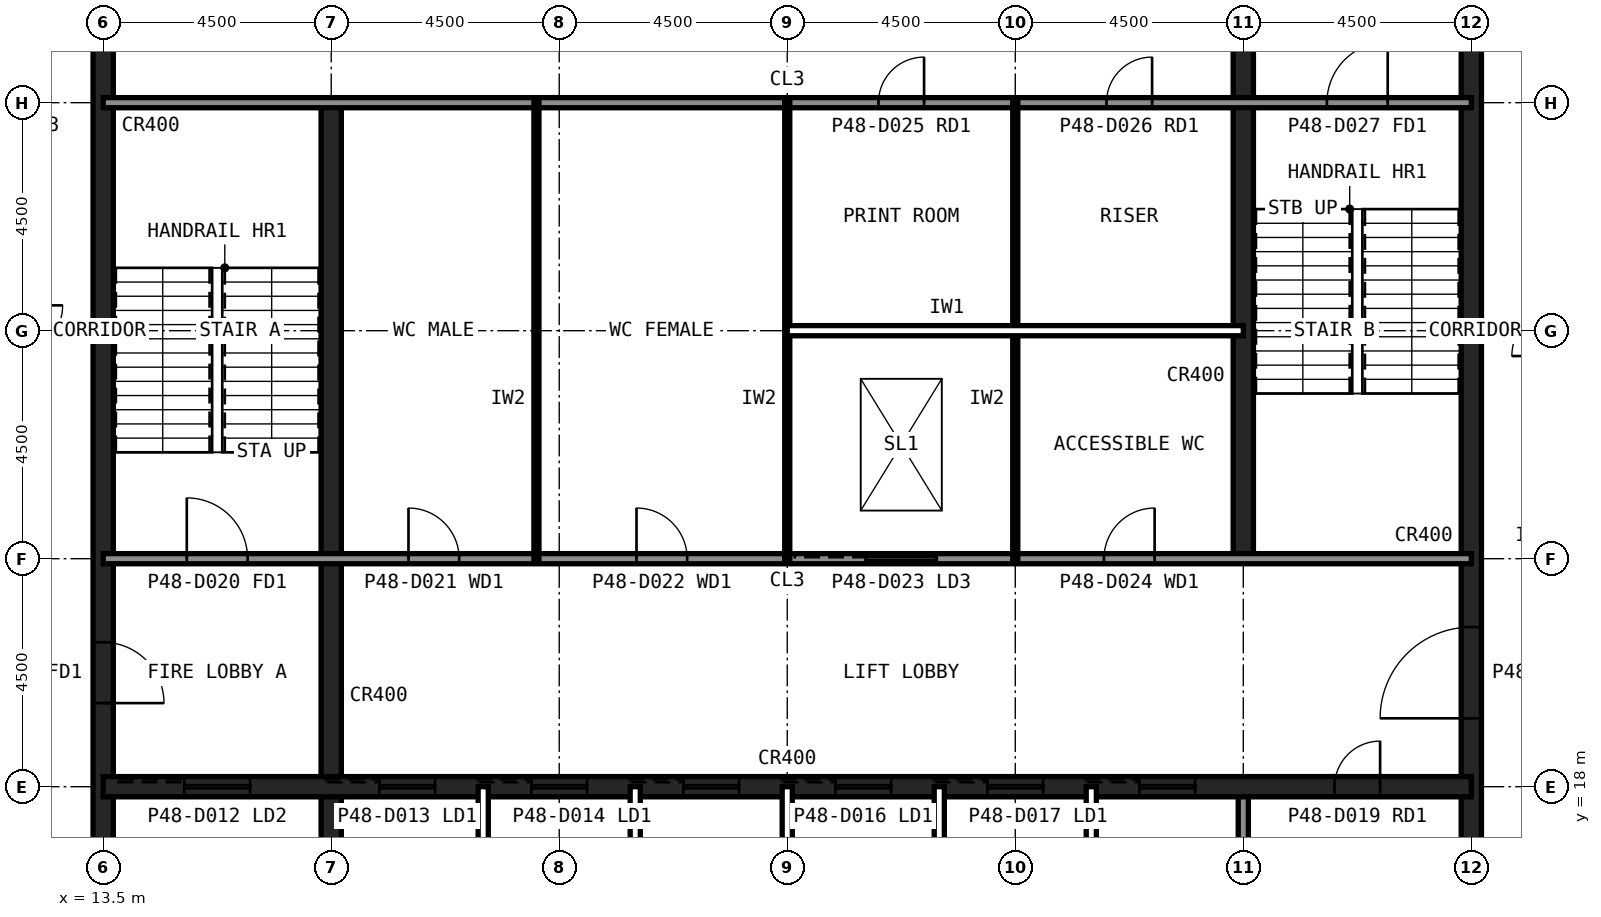
"""IFC4 building model, lengths in metres.
Left out: names, types, materials, properties, quantities, classifications, styles, units other than length and angle.
Written with IfcOpenShell. Run it as: python <this file> out.ifc"""

import sys

from ifc_helpers import new_model, si_unit, direction, frame, frame_2d, origin, place, context, subcontext, project, spatial, rectangle, extrude, element, fill, save


model = new_model("IFC4")
c1 = context("Model", 3, precision=1e-05, world=origin(), true_north=direction((0.0, 1.0)))
c2 = subcontext(c1, "Body", "Model", "MODEL_VIEW")
j1 = project(units=[si_unit("LENGTHUNIT", "METRE"), si_unit("PLANEANGLEUNIT", "RADIAN")], contexts=[c1])
p1 = place(None, origin())
s1 = spatial("IfcSite", under=j1, at=p1, CompositionType="ELEMENT")
p2 = place(p1, origin())
s2 = spatial("IfcBuilding", under=s1, at=p2, CompositionType="ELEMENT")
p3 = place(p2, frame((0.0, 0.0, 205.6)))
s3 = spatial("IfcBuildingStorey", under=s2, at=p3, CompositionType="ELEMENT", Elevation=205.6)
p4 = place(p3, frame((40.5, 13.5, 0.0), z_axis=(0.0, 0.0, 1.0), x_axis=(0.0, 1.0, 0.0)))
e1 = element("IfcWall", 1, at=p4, inside=s3, PredefinedType="SHEAR", context=c2, shape_type="SweptSolid", body=[
    extrude(rectangle(XDim=27.0, YDim=0.4, at=frame_2d((13.5, 0.0))), origin(), (0.0, 0.0, 1.0), 5.0),
])
p5 = place(p4, frame((5.85, 0.0, 0.0)))
e2 = element("IfcOpeningElement", 2, at=p5, cuts=e1, PredefinedType="OPENING", context=c2, shape_type="SweptSolid", body=[
    extrude(rectangle(XDim=1.8, YDim=2.1, at=frame_2d((0.9, 1.05))), frame((0.0, 0.21, 0.0), z_axis=(0.0, -1.0, 0.0), x_axis=(1.0, 0.0, 0.0)), (0.0, 0.0, 1.0), 0.42),
])
p6 = place(p4, frame((19.65, 0.0, 0.0)))
e3 = element("IfcOpeningElement", 3, at=p6, cuts=e1, PredefinedType="OPENING", context=c2, shape_type="SweptSolid", body=[
    extrude(rectangle(XDim=1.2, YDim=2.1, at=frame_2d((0.6, 1.05))), frame((0.0, 0.21, 0.0), z_axis=(0.0, -1.0, 0.0), x_axis=(1.0, 0.0, 0.0)), (0.0, 0.0, 1.0), 0.42),
])
p7 = place(p3, frame((13.5, 40.5, 0.0), z_axis=(0.0, 0.0, 1.0), x_axis=(0.0, -1.0, 0.0)))
e4 = element("IfcWall", 4, at=p7, inside=s3, PredefinedType="SHEAR", context=c2, shape_type="SweptSolid", body=[
    extrude(rectangle(XDim=27.0, YDim=0.4, at=frame_2d((13.5, 0.0))), origin(), (0.0, 0.0, 1.0), 5.0),
])
p8 = place(p7, frame((19.65, 0.0, 0.0)))
e5 = element("IfcOpeningElement", 5, at=p8, cuts=e4, PredefinedType="OPENING", context=c2, shape_type="SweptSolid", body=[
    extrude(rectangle(XDim=1.2, YDim=2.1, at=frame_2d((0.6, 1.05))), frame((0.0, 0.21, 0.0), z_axis=(0.0, -1.0, 0.0), x_axis=(1.0, 0.0, 0.0)), (0.0, 0.0, 1.0), 0.42),
])
p9 = place(p7, frame((5.85, 0.0, 0.0)))
e6 = element("IfcOpeningElement", 6, at=p9, cuts=e4, PredefinedType="OPENING", context=c2, shape_type="SweptSolid", body=[
    extrude(rectangle(XDim=1.8, YDim=2.1, at=frame_2d((0.9, 1.05))), frame((0.0, 0.21, 0.0), z_axis=(0.0, -1.0, 0.0), x_axis=(1.0, 0.0, 0.0)), (0.0, 0.0, 1.0), 0.42),
])
p10 = place(p3, frame((18.0, 13.5, 0.0), z_axis=(0.0, 0.0, 1.0), x_axis=(0.0, 1.0, 0.0)))
e7 = element("IfcWall", 7, at=p10, inside=s3, PredefinedType="SHEAR", context=c2, shape_type="SweptSolid", body=[
    extrude(rectangle(XDim=18.0, YDim=0.4, at=frame_2d((9.0, 0.0))), origin(), (0.0, 0.0, 1.0), 5.0),
])
p11 = place(p3, frame((36.0, 13.5, 0.0), z_axis=(0.0, 0.0, 1.0), x_axis=(0.0, 1.0, 0.0)))
e8 = element("IfcWall", 8, at=p11, inside=s3, PredefinedType="SOLIDWALL", context=c2, shape_type="SweptSolid", body=[
    extrude(rectangle(XDim=4.5, YDim=0.2, at=frame_2d((2.25, 0.0))), origin(), (0.0, 0.0, 1.0), 4.84),
])
p12 = place(p3, frame((36.0, 22.5, 0.0), z_axis=(0.0, 0.0, 1.0), x_axis=(0.0, 1.0, 0.0)))
e9 = element("IfcWall", 9, at=p12, inside=s3, PredefinedType="SHEAR", context=c2, shape_type="SweptSolid", body=[
    extrude(rectangle(XDim=18.0, YDim=0.4, at=frame_2d((9.0, 0.0))), origin(), (0.0, 0.0, 1.0), 5.0),
])
p13 = place(p3, frame((13.5, 18.0, 0.0), z_axis=(0.0, 0.0, 1.0), x_axis=(1.0, 0.0, 0.0)))
e10 = element("IfcWall", 10, at=p13, inside=s3, PredefinedType="SHEAR", context=c2, shape_type="SweptSolid", body=[
    extrude(rectangle(XDim=27.0, YDim=0.4, at=frame_2d((13.5, 0.0))), origin(), (0.0, 0.0, 1.0), 5.0),
])
p14 = place(p13, frame((24.3, 0.0, 0.0)))
e11 = element("IfcOpeningElement", 11, at=p14, cuts=e10, PredefinedType="OPENING", context=c2, shape_type="SweptSolid", body=[
    extrude(rectangle(XDim=0.9, YDim=2.1, at=frame_2d((0.45, 1.05))), frame((0.0, 0.21, 0.0), z_axis=(0.0, -1.0, 0.0), x_axis=(1.0, 0.0, 0.0)), (0.0, 0.0, 1.0), 0.42),
])
p15 = place(p13, frame((5.45, 0.0, 0.0)))
e12 = element("IfcOpeningElement", 12, at=p15, cuts=e10, PredefinedType="OPENING", context=c2, shape_type="SweptSolid", body=[
    extrude(rectangle(XDim=1.1, YDim=2.1, at=frame_2d((0.55, 1.05))), frame((0.0, 0.21, 0.0), z_axis=(0.0, -1.0, 0.0), x_axis=(1.0, 0.0, 0.0)), (0.0, 0.0, 1.0), 0.42),
])
p16 = place(p13, frame((8.45, 0.0, 0.0)))
e13 = element("IfcOpeningElement", 13, at=p16, cuts=e10, PredefinedType="OPENING", context=c2, shape_type="SweptSolid", body=[
    extrude(rectangle(XDim=1.1, YDim=2.1, at=frame_2d((0.55, 1.05))), frame((0.0, 0.21, 0.0), z_axis=(0.0, -1.0, 0.0), x_axis=(1.0, 0.0, 0.0)), (0.0, 0.0, 1.0), 0.42),
])
p17 = place(p13, frame((11.45, 0.0, 0.0)))
e14 = element("IfcOpeningElement", 14, at=p17, cuts=e10, PredefinedType="OPENING", context=c2, shape_type="SweptSolid", body=[
    extrude(rectangle(XDim=1.1, YDim=2.1, at=frame_2d((0.55, 1.05))), frame((0.0, 0.21, 0.0), z_axis=(0.0, -1.0, 0.0), x_axis=(1.0, 0.0, 0.0)), (0.0, 0.0, 1.0), 0.42),
])
p18 = place(p13, frame((14.45, 0.0, 0.0)))
e15 = element("IfcOpeningElement", 15, at=p18, cuts=e10, PredefinedType="OPENING", context=c2, shape_type="SweptSolid", body=[
    extrude(rectangle(XDim=1.1, YDim=2.1, at=frame_2d((0.55, 1.05))), frame((0.0, 0.21, 0.0), z_axis=(0.0, -1.0, 0.0), x_axis=(1.0, 0.0, 0.0)), (0.0, 0.0, 1.0), 0.42),
])
p19 = place(p13, frame((17.45, 0.0, 0.0)))
e16 = element("IfcOpeningElement", 16, at=p19, cuts=e10, PredefinedType="OPENING", context=c2, shape_type="SweptSolid", body=[
    extrude(rectangle(XDim=1.1, YDim=2.1, at=frame_2d((0.55, 1.05))), frame((0.0, 0.21, 0.0), z_axis=(0.0, -1.0, 0.0), x_axis=(1.0, 0.0, 0.0)), (0.0, 0.0, 1.0), 0.42),
])
p20 = place(p13, frame((20.45, 0.0, 0.0)))
e17 = element("IfcOpeningElement", 17, at=p20, cuts=e10, PredefinedType="OPENING", context=c2, shape_type="SweptSolid", body=[
    extrude(rectangle(XDim=1.1, YDim=2.1, at=frame_2d((0.55, 1.05))), frame((0.0, 0.21, 0.0), z_axis=(0.0, -1.0, 0.0), x_axis=(1.0, 0.0, 0.0)), (0.0, 0.0, 1.0), 0.42),
])
p21 = place(p13, frame((1.6, 0.0, 0.0)))
e18 = element("IfcOpeningElement", 18, at=p21, cuts=e10, PredefinedType="OPENING", context=c2, shape_type="SweptSolid", body=[
    extrude(rectangle(XDim=1.3, YDim=2.2, at=frame_2d((0.65, 1.1))), frame((0.0, 0.21, 0.0), z_axis=(0.0, -1.0, 0.0), x_axis=(1.0, 0.0, 0.0)), (0.0, 0.0, 1.0), 0.42),
])
p22 = place(p3, frame((13.5, 22.5, 0.0), z_axis=(0.0, 0.0, 1.0), x_axis=(1.0, 0.0, 0.0)))
e19 = element("IfcWall", 19, at=p22, inside=s3, PredefinedType="SOLIDWALL", context=c2, shape_type="SweptSolid", body=[
    extrude(rectangle(XDim=27.0, YDim=0.2, at=frame_2d((13.5, 0.0))), origin(), (0.0, 0.0, 1.0), 4.84),
])
p23 = place(p22, frame((1.65, 0.0, 0.0)))
e20 = element("IfcOpeningElement", 20, at=p23, cuts=e19, PredefinedType="OPENING", context=c2, shape_type="SweptSolid", body=[
    extrude(rectangle(XDim=1.2, YDim=2.1, at=frame_2d((0.6, 1.05))), frame((0.0, 0.11, 0.0), z_axis=(0.0, -1.0, 0.0), x_axis=(1.0, 0.0, 0.0)), (0.0, 0.0, 1.0), 0.22),
])
p24 = place(p22, frame((6.025, 0.0, 0.0)))
e21 = element("IfcOpeningElement", 21, at=p24, cuts=e19, PredefinedType="OPENING", context=c2, shape_type="SweptSolid", body=[
    extrude(rectangle(XDim=1.0, YDim=2.1, at=frame_2d((0.5, 1.05))), frame((0.0, 0.11, 0.0), z_axis=(0.0, -1.0, 0.0), x_axis=(1.0, 0.0, 0.0)), (0.0, 0.0, 1.0), 0.22),
])
p25 = place(p22, frame((10.525, 0.0, 0.0)))
e22 = element("IfcOpeningElement", 22, at=p25, cuts=e19, PredefinedType="OPENING", context=c2, shape_type="SweptSolid", body=[
    extrude(rectangle(XDim=1.0, YDim=2.1, at=frame_2d((0.5, 1.05))), frame((0.0, 0.11, 0.0), z_axis=(0.0, -1.0, 0.0), x_axis=(1.0, 0.0, 0.0)), (0.0, 0.0, 1.0), 0.22),
])
p26 = place(p22, frame((19.75, 0.0, 0.0)))
e23 = element("IfcOpeningElement", 23, at=p26, cuts=e19, PredefinedType="OPENING", context=c2, shape_type="SweptSolid", body=[
    extrude(rectangle(XDim=1.0, YDim=2.1, at=frame_2d((0.5, 1.05))), frame((0.0, 0.11, 0.0), z_axis=(0.0, -1.0, 0.0), x_axis=(1.0, 0.0, 0.0)), (0.0, 0.0, 1.0), 0.22),
])
p27 = place(p22, frame((15.05, 0.0, 0.0)))
e24 = element("IfcOpeningElement", 24, at=p27, cuts=e19, PredefinedType="OPENING", context=c2, shape_type="SweptSolid", body=[
    extrude(rectangle(XDim=1.4, YDim=2.4, at=frame_2d((0.7, 1.2))), frame((0.0, 0.11, 0.0), z_axis=(0.0, -1.0, 0.0), x_axis=(1.0, 0.0, 0.0)), (0.0, 0.0, 1.0), 0.22),
])
p28 = place(p3, frame((13.5, 31.5, 0.0), z_axis=(0.0, 0.0, 1.0), x_axis=(1.0, 0.0, 0.0)))
e25 = element("IfcWall", 25, at=p28, inside=s3, PredefinedType="SOLIDWALL", context=c2, shape_type="SweptSolid", body=[
    extrude(rectangle(XDim=27.0, YDim=0.2, at=frame_2d((13.5, 0.0))), origin(), (0.0, 0.0, 1.0), 4.84),
])
p29 = place(p28, frame((24.15, 0.0, 0.0)))
e26 = element("IfcOpeningElement", 26, at=p29, cuts=e25, PredefinedType="OPENING", context=c2, shape_type="SweptSolid", body=[
    extrude(rectangle(XDim=1.2, YDim=2.1, at=frame_2d((0.6, 1.05))), frame((0.0, 0.11, 0.0), z_axis=(0.0, -1.0, 0.0), x_axis=(1.0, 0.0, 0.0)), (0.0, 0.0, 1.0), 0.22),
])
p30 = place(p28, frame((15.3, 0.0, 0.0)))
e27 = element("IfcOpeningElement", 27, at=p30, cuts=e25, PredefinedType="OPENING", context=c2, shape_type="SweptSolid", body=[
    extrude(rectangle(XDim=0.9, YDim=2.1, at=frame_2d((0.45, 1.05))), frame((0.0, 0.11, 0.0), z_axis=(0.0, -1.0, 0.0), x_axis=(1.0, 0.0, 0.0)), (0.0, 0.0, 1.0), 0.22),
])
p31 = place(p28, frame((19.8, 0.0, 0.0)))
e28 = element("IfcOpeningElement", 28, at=p31, cuts=e25, PredefinedType="OPENING", context=c2, shape_type="SweptSolid", body=[
    extrude(rectangle(XDim=0.9, YDim=2.1, at=frame_2d((0.45, 1.05))), frame((0.0, 0.11, 0.0), z_axis=(0.0, -1.0, 0.0), x_axis=(1.0, 0.0, 0.0)), (0.0, 0.0, 1.0), 0.22),
])
for number, where, z_axis, x_axis in (
    (29, (21.0, 13.5, 0.0), (0.0, 0.0, 1.0), (0.0, 1.0, 0.0)),
    (30, (24.0, 13.5, 0.0), (0.0, 0.0, 1.0), (0.0, 1.0, 0.0)),
    (31, (27.0, 13.5, 0.0), (0.0, 0.0, 1.0), (0.0, 1.0, 0.0)),
    (32, (30.0, 13.5, 0.0), (0.0, 0.0, 1.0), (0.0, 1.0, 0.0)),
    (33, (33.0, 13.5, 0.0), (0.0, 0.0, 1.0), (0.0, 1.0, 0.0)),
):
    element("IfcWall", number, at=place(p3, frame(where, z_axis=z_axis, x_axis=x_axis)), inside=s3, PredefinedType="PARTITIONING", context=c2, shape_type="SweptSolid", body=[
        extrude(rectangle(XDim=4.5, YDim=0.2, at=frame_2d((2.25, 0.0))), origin(), (0.0, 0.0, 1.0), 4.84),
    ])
for number, where, z_axis, x_axis in (
    (34, (22.05, 22.5, 0.0), (0.0, 0.0, 1.0), (0.0, 1.0, 0.0)),
    (35, (27.0, 22.5, 0.0), (0.0, 0.0, 1.0), (0.0, 1.0, 0.0)),
    (36, (31.5, 22.5, 0.0), (0.0, 0.0, 1.0), (0.0, 1.0, 0.0)),
):
    element("IfcWall", number, at=place(p3, frame(where, z_axis=z_axis, x_axis=x_axis)), inside=s3, PredefinedType="PLUMBINGWALL", context=c2, shape_type="SweptSolid", body=[
        extrude(rectangle(XDim=9.0, YDim=0.1, at=frame_2d((4.5, 0.0))), origin(), (0.0, 0.0, 1.0), 4.84),
    ])
p32 = place(p3, frame((27.0, 27.0, 0.0), z_axis=(0.0, 0.0, 1.0), x_axis=(1.0, 0.0, 0.0)))
e37 = element("IfcWall", 37, at=p32, inside=s3, PredefinedType="PARTITIONING", context=c2, shape_type="SweptSolid", body=[
    extrude(rectangle(XDim=9.0, YDim=0.2, at=frame_2d((4.5, 0.0))), origin(), (0.0, 0.0, 1.0), 4.84),
])
p33 = place(p8, origin())
e38 = element("IfcDoor", 38, at=p33, inside=s3, OperationType="SINGLE_SWING_RIGHT", PredefinedType="DOOR", context=c2, shape_type="SweptSolid", body=[
    extrude(rectangle(XDim=1.2, YDim=2.1, at=frame_2d((0.6, 1.05))), frame((0.0, 0.025, 0.0), z_axis=(0.0, -1.0, 0.0), x_axis=(1.0, 0.0, 0.0)), (0.0, 0.0, 1.0), 0.05),
])
fill(e5, e38)
p34 = place(p5, origin())
e39 = element("IfcDoor", 39, at=p34, inside=s3, OperationType="SINGLE_SWING_LEFT", PredefinedType="DOOR", context=c2, shape_type="SweptSolid", body=[
    extrude(rectangle(XDim=1.8, YDim=2.1, at=frame_2d((0.9, 1.05))), frame((0.0, 0.025, 0.0), z_axis=(0.0, -1.0, 0.0), x_axis=(1.0, 0.0, 0.0)), (0.0, 0.0, 1.0), 0.05),
])
fill(e2, e39)
p35 = place(p23, origin())
e40 = element("IfcDoor", 40, at=p35, inside=s3, OperationType="SINGLE_SWING_LEFT", PredefinedType="DOOR", context=c2, shape_type="SweptSolid", body=[
    extrude(rectangle(XDim=1.2, YDim=2.1, at=frame_2d((0.6, 1.05))), frame((0.0, 0.025, 0.0), z_axis=(0.0, -1.0, 0.0), x_axis=(1.0, 0.0, 0.0)), (0.0, 0.0, 1.0), 0.05),
])
fill(e20, e40)
p36 = place(p29, origin())
e41 = element("IfcDoor", 41, at=p36, inside=s3, OperationType="SINGLE_SWING_RIGHT", PredefinedType="DOOR", context=c2, shape_type="SweptSolid", body=[
    extrude(rectangle(XDim=1.2, YDim=2.1, at=frame_2d((0.6, 1.05))), frame((0.0, 0.025, 0.0), z_axis=(0.0, -1.0, 0.0), x_axis=(1.0, 0.0, 0.0)), (0.0, 0.0, 1.0), 0.05),
])
fill(e26, e41)
p37 = place(p24, origin())
e42 = element("IfcDoor", 42, at=p37, inside=s3, OperationType="SINGLE_SWING_LEFT", PredefinedType="DOOR", context=c2, shape_type="SweptSolid", body=[
    extrude(rectangle(XDim=1.0, YDim=2.1, at=frame_2d((0.5, 1.05))), frame((0.0, 0.025, 0.0), z_axis=(0.0, -1.0, 0.0), x_axis=(1.0, 0.0, 0.0)), (0.0, 0.0, 1.0), 0.05),
])
fill(e21, e42)
p38 = place(p25, origin())
e43 = element("IfcDoor", 43, at=p38, inside=s3, OperationType="SINGLE_SWING_LEFT", PredefinedType="DOOR", context=c2, shape_type="SweptSolid", body=[
    extrude(rectangle(XDim=1.0, YDim=2.1, at=frame_2d((0.5, 1.05))), frame((0.0, 0.025, 0.0), z_axis=(0.0, -1.0, 0.0), x_axis=(1.0, 0.0, 0.0)), (0.0, 0.0, 1.0), 0.05),
])
fill(e22, e43)
p39 = place(p26, origin())
e44 = element("IfcDoor", 44, at=p39, inside=s3, OperationType="SINGLE_SWING_RIGHT", PredefinedType="DOOR", context=c2, shape_type="SweptSolid", body=[
    extrude(rectangle(XDim=1.0, YDim=2.1, at=frame_2d((0.5, 1.05))), frame((0.0, 0.025, 0.0), z_axis=(0.0, -1.0, 0.0), x_axis=(1.0, 0.0, 0.0)), (0.0, 0.0, 1.0), 0.05),
])
fill(e23, e44)
p40 = place(p30, origin())
e45 = element("IfcDoor", 45, at=p40, inside=s3, OperationType="SINGLE_SWING_RIGHT", PredefinedType="DOOR", context=c2, shape_type="SweptSolid", body=[
    extrude(rectangle(XDim=0.9, YDim=2.1, at=frame_2d((0.45, 1.05))), frame((0.0, 0.025, 0.0), z_axis=(0.0, -1.0, 0.0), x_axis=(1.0, 0.0, 0.0)), (0.0, 0.0, 1.0), 0.05),
])
fill(e27, e45)
p41 = place(p31, origin())
e46 = element("IfcDoor", 46, at=p41, inside=s3, OperationType="SINGLE_SWING_RIGHT", PredefinedType="DOOR", context=c2, shape_type="SweptSolid", body=[
    extrude(rectangle(XDim=0.9, YDim=2.1, at=frame_2d((0.45, 1.05))), frame((0.0, 0.025, 0.0), z_axis=(0.0, -1.0, 0.0), x_axis=(1.0, 0.0, 0.0)), (0.0, 0.0, 1.0), 0.05),
])
fill(e28, e46)
p42 = place(p14, origin())
e47 = element("IfcDoor", 47, at=p42, inside=s3, OperationType="SINGLE_SWING_RIGHT", PredefinedType="DOOR", context=c2, shape_type="SweptSolid", body=[
    extrude(rectangle(XDim=0.9, YDim=2.1, at=frame_2d((0.45, 1.05))), frame((0.0, 0.025, 0.0), z_axis=(0.0, -1.0, 0.0), x_axis=(1.0, 0.0, 0.0)), (0.0, 0.0, 1.0), 0.05),
])
fill(e11, e47)
p43 = place(p15, origin())
e48 = element("IfcDoor", 48, at=p43, inside=s3, OperationType="SLIDING_TO_LEFT", PredefinedType="DOOR", context=c2, shape_type="SweptSolid", body=[
    extrude(rectangle(XDim=1.1, YDim=2.1, at=frame_2d((0.55, 1.05))), frame((0.0, 0.025, 0.0), z_axis=(0.0, -1.0, 0.0), x_axis=(1.0, 0.0, 0.0)), (0.0, 0.0, 1.0), 0.05),
])
fill(e12, e48)
p44 = place(p16, origin())
e49 = element("IfcDoor", 49, at=p44, inside=s3, OperationType="SLIDING_TO_LEFT", PredefinedType="DOOR", context=c2, shape_type="SweptSolid", body=[
    extrude(rectangle(XDim=1.1, YDim=2.1, at=frame_2d((0.55, 1.05))), frame((0.0, 0.025, 0.0), z_axis=(0.0, -1.0, 0.0), x_axis=(1.0, 0.0, 0.0)), (0.0, 0.0, 1.0), 0.05),
])
fill(e13, e49)
p45 = place(p17, origin())
e50 = element("IfcDoor", 50, at=p45, inside=s3, OperationType="SLIDING_TO_LEFT", PredefinedType="DOOR", context=c2, shape_type="SweptSolid", body=[
    extrude(rectangle(XDim=1.1, YDim=2.1, at=frame_2d((0.55, 1.05))), frame((0.0, 0.025, 0.0), z_axis=(0.0, -1.0, 0.0), x_axis=(1.0, 0.0, 0.0)), (0.0, 0.0, 1.0), 0.05),
])
fill(e14, e50)
p46 = place(p18, origin())
e51 = element("IfcDoor", 51, at=p46, inside=s3, OperationType="SLIDING_TO_LEFT", PredefinedType="DOOR", context=c2, shape_type="SweptSolid", body=[
    extrude(rectangle(XDim=1.1, YDim=2.1, at=frame_2d((0.55, 1.05))), frame((0.0, 0.025, 0.0), z_axis=(0.0, -1.0, 0.0), x_axis=(1.0, 0.0, 0.0)), (0.0, 0.0, 1.0), 0.05),
])
fill(e15, e51)
p47 = place(p19, origin())
e52 = element("IfcDoor", 52, at=p47, inside=s3, OperationType="SLIDING_TO_LEFT", PredefinedType="DOOR", context=c2, shape_type="SweptSolid", body=[
    extrude(rectangle(XDim=1.1, YDim=2.1, at=frame_2d((0.55, 1.05))), frame((0.0, 0.025, 0.0), z_axis=(0.0, -1.0, 0.0), x_axis=(1.0, 0.0, 0.0)), (0.0, 0.0, 1.0), 0.05),
])
fill(e16, e52)
p48 = place(p20, origin())
e53 = element("IfcDoor", 53, at=p48, inside=s3, OperationType="SLIDING_TO_LEFT", PredefinedType="DOOR", context=c2, shape_type="SweptSolid", body=[
    extrude(rectangle(XDim=1.1, YDim=2.1, at=frame_2d((0.55, 1.05))), frame((0.0, 0.025, 0.0), z_axis=(0.0, -1.0, 0.0), x_axis=(1.0, 0.0, 0.0)), (0.0, 0.0, 1.0), 0.05),
])
fill(e17, e53)
p49 = place(p21, origin())
e54 = element("IfcDoor", 54, at=p49, inside=s3, OperationType="SLIDING_TO_LEFT", PredefinedType="DOOR", context=c2, shape_type="SweptSolid", body=[
    extrude(rectangle(XDim=1.3, YDim=2.2, at=frame_2d((0.65, 1.1))), frame((0.0, 0.025, 0.0), z_axis=(0.0, -1.0, 0.0), x_axis=(1.0, 0.0, 0.0)), (0.0, 0.0, 1.0), 0.05),
])
fill(e18, e54)
p50 = place(p27, origin())
e55 = element("IfcDoor", 55, at=p50, inside=s3, OperationType="SLIDING_TO_LEFT", PredefinedType="DOOR", context=c2, shape_type="SweptSolid", body=[
    extrude(rectangle(XDim=1.4, YDim=2.4, at=frame_2d((0.7, 1.2))), frame((0.0, 0.025, 0.0), z_axis=(0.0, -1.0, 0.0), x_axis=(1.0, 0.0, 0.0)), (0.0, 0.0, 1.0), 0.05),
])
fill(e24, e55)
save(model, sys.argv[1])
